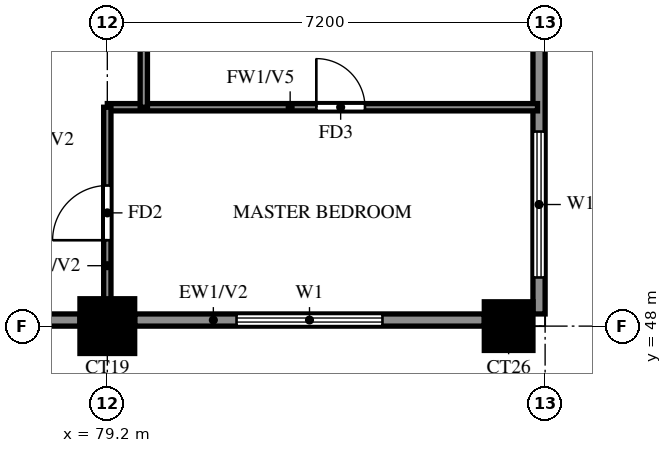
"""IFC4 building model, lengths in metres.
Left out: names, types, materials, properties, quantities, classifications, styles, units other than length and angle.
Written with IfcOpenShell. Run it as: python <this file> out.ifc"""

import sys

from ifc_helpers import new_model, si_unit, direction, frame, frame_2d, origin, origin_2d, place, context, subcontext, project, spatial, rectangle, extrude, source, transform, mapped, element, fill, save


model = new_model("IFC4")
c1 = context("Model", 3, precision=1e-05, world=origin(), true_north=direction((0.0, 1.0)))
c2 = subcontext(c1, "Body", "Model", "MODEL_VIEW")
j1 = project(units=[si_unit("LENGTHUNIT", "METRE"), si_unit("PLANEANGLEUNIT", "RADIAN")], contexts=[c1])
p1 = place(None, origin())
s1 = spatial("IfcSite", under=j1, at=p1, CompositionType="ELEMENT")
p2 = place(p1, origin())
s2 = spatial("IfcBuilding", under=s1, at=p2, CompositionType="ELEMENT")
p3 = place(p2, frame((0.0, 0.0, 199.0)))
s3 = spatial("IfcBuildingStorey", under=s2, at=p3, CompositionType="ELEMENT", Elevation=199.0)
m1 = source(origin(), c2, "Body", "SweptSolid", [
    extrude(rectangle(XDim=0.9, YDim=0.9, at=origin_2d()), origin(), (0.0, 0.0, 1.0), 3.2),
])
p4 = place(p3, frame((79.2, 48.0, 0.0), z_axis=(0.0, 0.0, 1.0), x_axis=(1.0, 0.0, 0.0)))
e1 = element("IfcColumn", 1, at=p4, inside=s3, PredefinedType="COLUMN", context=c2, shape_type="MappedRepresentation", body=[
    mapped(m1, transform((0.0, 0.0, 0.0))),
])
m2 = source(origin(), c2, "Body", "SweptSolid", [
    extrude(rectangle(XDim=0.8, YDim=0.8, at=origin_2d()), origin(), (0.0, 0.0, 1.0), 3.2),
])
p5 = place(p3, frame((85.8, 48.0, 0.0), z_axis=(0.0, 0.0, 1.0), x_axis=(1.0, 0.0, 0.0)))
e2 = element("IfcColumn", 2, at=p5, inside=s3, PredefinedType="COLUMN", context=c2, shape_type="MappedRepresentation", body=[
    mapped(m2, transform((0.0, 0.0, 0.0))),
])
p6 = place(p3, frame((85.719, 39.881, 0.0), z_axis=(0.0, 0.0, 1.0), x_axis=(-0.86377618652, 0.503875678716, 0.0)))
e3 = element("IfcWall", 3, at=p6, inside=s3, PredefinedType="SOLIDWALL", context=c2, shape_type="SweptSolid", body=[
    extrude(rectangle(XDim=16.311, YDim=0.2, at=frame_2d((8.156, 0.0))), origin(), (0.0, 0.0, 1.0), 3.2),
])
p7 = place(p6, frame((13.326, 0.0, 1.5)))
e4 = element("IfcOpeningElement", 4, at=p7, cuts=e3, PredefinedType="OPENING", context=c2, shape_type="SweptSolid", body=[
    extrude(rectangle(XDim=0.9, YDim=0.9, at=frame_2d((0.45, 0.45))), frame((0.0, 0.11, 0.0), z_axis=(0.0, -1.0, 0.0), x_axis=(1.0, 0.0, 0.0)), (0.0, 0.0, 1.0), 0.22),
])
p8 = place(p3, frame((71.99, 48.1, 0.0), z_axis=(0.0, 0.0, 1.0), x_axis=(1.0, 0.0, 0.0)))
e5 = element("IfcWall", 5, at=p8, inside=s3, PredefinedType="SOLIDWALL", context=c2, shape_type="SweptSolid", body=[
    extrude(rectangle(XDim=6.76, YDim=0.2, at=frame_2d((3.38, 0.0))), origin(), (0.0, 0.0, 1.0), 3.2),
])
p9 = place(p8, frame((2.205, 0.0, 1.5)))
e6 = element("IfcOpeningElement", 6, at=p9, cuts=e5, PredefinedType="OPENING", context=c2, shape_type="SweptSolid", body=[
    extrude(rectangle(XDim=0.9, YDim=0.9, at=frame_2d((0.45, 0.45))), frame((0.0, 0.11, 0.0), z_axis=(0.0, -1.0, 0.0), x_axis=(1.0, 0.0, 0.0)), (0.0, 0.0, 1.0), 0.22),
])
p10 = place(p3, frame((79.65, 48.1, 0.0), z_axis=(0.0, 0.0, 1.0), x_axis=(1.0, 0.0, 0.0)))
e7 = element("IfcWall", 7, at=p10, inside=s3, PredefinedType="SOLIDWALL", context=c2, shape_type="SweptSolid", body=[
    extrude(rectangle(XDim=5.75, YDim=0.2, at=frame_2d((2.875, 0.0))), origin(), (0.0, 0.0, 1.0), 3.2),
])
p11 = place(p10, frame((1.675, 0.0, 0.6)))
e8 = element("IfcOpeningElement", 8, at=p11, cuts=e7, PredefinedType="OPENING", context=c2, shape_type="SweptSolid", body=[
    extrude(rectangle(XDim=2.4, YDim=2.4, at=frame_2d((1.2, 1.2))), frame((0.0, 0.11, 0.0), z_axis=(0.0, -1.0, 0.0), x_axis=(1.0, 0.0, 0.0)), (0.0, 0.0, 1.0), 0.22),
])
p12 = place(p3, frame((86.3, 48.2, 0.0), z_axis=(0.0, 0.0, 1.0), x_axis=(0.0, 1.0, 0.0)))
e9 = element("IfcWall", 9, at=p12, inside=s3, PredefinedType="SOLIDWALL", context=c2, shape_type="SweptSolid", body=[
    extrude(rectangle(XDim=28.6, YDim=0.2, at=frame_2d((14.3, 0.0))), origin(), (0.0, 0.0, 1.0), 3.2),
])
p13 = place(p12, frame((11.5, 0.0, 0.0)))
e10 = element("IfcOpeningElement", 10, at=p13, cuts=e9, PredefinedType="OPENING", context=c2, shape_type="SweptSolid", body=[
    extrude(rectangle(XDim=1.8, YDim=2.4, at=frame_2d((0.9, 1.2))), frame((0.0, 0.11, 0.0), z_axis=(0.0, -1.0, 0.0), x_axis=(1.0, 0.0, 0.0)), (0.0, 0.0, 1.0), 0.22),
])
p14 = place(p12, frame((0.6, 0.0, 0.6)))
e11 = element("IfcOpeningElement", 11, at=p14, cuts=e9, PredefinedType="OPENING", context=c2, shape_type="SweptSolid", body=[
    extrude(rectangle(XDim=2.4, YDim=2.4, at=frame_2d((1.2, 1.2))), frame((0.0, 0.11, 0.0), z_axis=(0.0, -1.0, 0.0), x_axis=(1.0, 0.0, 0.0)), (0.0, 0.0, 1.0), 0.22),
])
p15 = place(p12, frame((4.575, 0.0, 1.5)))
e12 = element("IfcOpeningElement", 12, at=p15, cuts=e9, PredefinedType="OPENING", context=c2, shape_type="SweptSolid", body=[
    extrude(rectangle(XDim=0.9, YDim=0.9, at=frame_2d((0.45, 0.45))), frame((0.0, 0.11, 0.0), z_axis=(0.0, -1.0, 0.0), x_axis=(1.0, 0.0, 0.0)), (0.0, 0.0, 1.0), 0.22),
])
p16 = place(p12, frame((7.475, 0.0, 0.6)))
e13 = element("IfcOpeningElement", 13, at=p16, cuts=e9, PredefinedType="OPENING", context=c2, shape_type="SweptSolid", body=[
    extrude(rectangle(XDim=1.8, YDim=2.4, at=frame_2d((0.9, 1.2))), frame((0.0, 0.11, 0.0), z_axis=(0.0, -1.0, 0.0), x_axis=(1.0, 0.0, 0.0)), (0.0, 0.0, 1.0), 0.22),
])
p17 = place(p12, frame((10.15, 0.0, 0.6)))
e14 = element("IfcOpeningElement", 14, at=p17, cuts=e9, PredefinedType="OPENING", context=c2, shape_type="SweptSolid", body=[
    extrude(rectangle(XDim=0.9, YDim=2.4, at=frame_2d((0.45, 1.2))), frame((0.0, 0.11, 0.0), z_axis=(0.0, -1.0, 0.0), x_axis=(1.0, 0.0, 0.0)), (0.0, 0.0, 1.0), 0.22),
])
p18 = place(p12, frame((14.675, 0.0, 0.6)))
e15 = element("IfcOpeningElement", 15, at=p18, cuts=e9, PredefinedType="OPENING", context=c2, shape_type="SweptSolid", body=[
    extrude(rectangle(XDim=1.2, YDim=2.4, at=frame_2d((0.6, 1.2))), frame((0.0, 0.11, 0.0), z_axis=(0.0, -1.0, 0.0), x_axis=(1.0, 0.0, 0.0)), (0.0, 0.0, 1.0), 0.22),
])
p19 = place(p12, frame((16.75, 0.0, 0.6)))
e16 = element("IfcOpeningElement", 16, at=p19, cuts=e9, PredefinedType="OPENING", context=c2, shape_type="SweptSolid", body=[
    extrude(rectangle(XDim=0.9, YDim=2.4, at=frame_2d((0.45, 1.2))), frame((0.0, 0.11, 0.0), z_axis=(0.0, -1.0, 0.0), x_axis=(1.0, 0.0, 0.0)), (0.0, 0.0, 1.0), 0.22),
])
p20 = place(p12, frame((18.975, 0.0, 1.5)))
e17 = element("IfcOpeningElement", 17, at=p20, cuts=e9, PredefinedType="OPENING", context=c2, shape_type="SweptSolid", body=[
    extrude(rectangle(XDim=0.9, YDim=0.9, at=frame_2d((0.45, 0.45))), frame((0.0, 0.11, 0.0), z_axis=(0.0, -1.0, 0.0), x_axis=(1.0, 0.0, 0.0)), (0.0, 0.0, 1.0), 0.22),
])
p21 = place(p12, frame((22.175, 0.0, 0.6)))
e18 = element("IfcOpeningElement", 18, at=p21, cuts=e9, PredefinedType="OPENING", context=c2, shape_type="SweptSolid", body=[
    extrude(rectangle(XDim=2.4, YDim=2.4, at=frame_2d((1.2, 1.2))), frame((0.0, 0.11, 0.0), z_axis=(0.0, -1.0, 0.0), x_axis=(1.0, 0.0, 0.0)), (0.0, 0.0, 1.0), 0.22),
])
p22 = place(p12, frame((25.425, 0.0, 0.6)))
e19 = element("IfcOpeningElement", 19, at=p22, cuts=e9, PredefinedType="OPENING", context=c2, shape_type="SweptSolid", body=[
    extrude(rectangle(XDim=2.4, YDim=2.4, at=frame_2d((1.2, 1.2))), frame((0.0, 0.11, 0.0), z_axis=(0.0, -1.0, 0.0), x_axis=(1.0, 0.0, 0.0)), (0.0, 0.0, 1.0), 0.22),
])
p23 = place(p3, frame((79.2, 51.6, 0.0), z_axis=(0.0, 0.0, 1.0), x_axis=(1.0, 0.0, 0.0)))
e20 = element("IfcWall", 20, at=p23, inside=s3, PredefinedType="PARTITIONING", context=c2, shape_type="SweptSolid", body=[
    extrude(rectangle(XDim=7.075, YDim=0.12, at=frame_2d((3.538, 0.0))), origin(), (0.0, 0.0, 1.0), 2.3),
])
p24 = place(p23, frame((3.438, 0.0, 0.0)))
e21 = element("IfcOpeningElement", 21, at=p24, cuts=e20, PredefinedType="OPENING", context=c2, shape_type="SweptSolid", body=[
    extrude(rectangle(XDim=0.8, YDim=2.1, at=frame_2d((0.4, 1.05))), frame((0.0, 0.07, 0.0), z_axis=(0.0, -1.0, 0.0), x_axis=(1.0, 0.0, 0.0)), (0.0, 0.0, 1.0), 0.14),
])
p25 = place(p3, frame((79.2, 48.125, 0.0), z_axis=(0.0, 0.0, 1.0), x_axis=(0.0, 1.0, 0.0)))
e22 = element("IfcWall", 22, at=p25, inside=s3, PredefinedType="PARTITIONING", context=c2, shape_type="SweptSolid", body=[
    extrude(rectangle(XDim=3.475, YDim=0.12, at=frame_2d((1.738, 0.0))), origin(), (0.0, 0.0, 1.0), 3.2),
])
p26 = place(p25, frame((1.288, 0.0, 0.0)))
e23 = element("IfcOpeningElement", 23, at=p26, cuts=e22, PredefinedType="OPENING", context=c2, shape_type="SweptSolid", body=[
    extrude(rectangle(XDim=0.9, YDim=2.1, at=frame_2d((0.45, 1.05))), frame((0.0, 0.07, 0.0), z_axis=(0.0, -1.0, 0.0), x_axis=(1.0, 0.0, 0.0)), (0.0, 0.0, 1.0), 0.14),
])
p27 = place(p3, frame((79.8, 51.6, 0.0), z_axis=(0.0, 0.0, 1.0), x_axis=(0.0, 1.0, 0.0)))
e24 = element("IfcWall", 24, at=p27, inside=s3, PredefinedType="PARTITIONING", context=c2, shape_type="SweptSolid", body=[
    extrude(rectangle(XDim=3.6, YDim=0.12, at=frame_2d((1.8, 0.0))), origin(), (0.0, 0.0, 1.0), 3.2),
])
p28 = place(p11, origin())
e25 = element("IfcWindow", 25, at=p28, inside=s3, PartitioningType="DOUBLE_PANEL_VERTICAL", PredefinedType="WINDOW", context=c2, shape_type="SweptSolid", body=[
    extrude(rectangle(XDim=2.4, YDim=2.4, at=frame_2d((1.2, 1.2))), frame((0.0, 0.03, 0.0), z_axis=(0.0, -1.0, 0.0), x_axis=(1.0, 0.0, 0.0)), (0.0, 0.0, 1.0), 0.06),
])
fill(e8, e25)
p29 = place(p14, origin())
e26 = element("IfcWindow", 26, at=p29, inside=s3, PartitioningType="DOUBLE_PANEL_VERTICAL", PredefinedType="WINDOW", context=c2, shape_type="SweptSolid", body=[
    extrude(rectangle(XDim=2.4, YDim=2.4, at=frame_2d((1.2, 1.2))), frame((0.0, 0.03, 0.0), z_axis=(0.0, -1.0, 0.0), x_axis=(1.0, 0.0, 0.0)), (0.0, 0.0, 1.0), 0.06),
])
fill(e11, e26)
p30 = place(p26, origin())
e27 = element("IfcDoor", 27, at=p30, inside=s3, OperationType="SINGLE_SWING_RIGHT", PredefinedType="DOOR", context=c2, shape_type="SweptSolid", body=[
    extrude(rectangle(XDim=0.9, YDim=2.1, at=frame_2d((0.45, 1.05))), frame((0.0, 0.025, 0.0), z_axis=(0.0, -1.0, 0.0), x_axis=(1.0, 0.0, 0.0)), (0.0, 0.0, 1.0), 0.05),
])
fill(e23, e27)
p31 = place(p24, origin())
e28 = element("IfcDoor", 28, at=p31, inside=s3, OperationType="SINGLE_SWING_LEFT", PredefinedType="DOOR", context=c2, shape_type="SweptSolid", body=[
    extrude(rectangle(XDim=0.8, YDim=2.1, at=frame_2d((0.4, 1.05))), frame((0.0, 0.025, 0.0), z_axis=(0.0, -1.0, 0.0), x_axis=(1.0, 0.0, 0.0)), (0.0, 0.0, 1.0), 0.05),
])
fill(e21, e28)
save(model, sys.argv[1])
